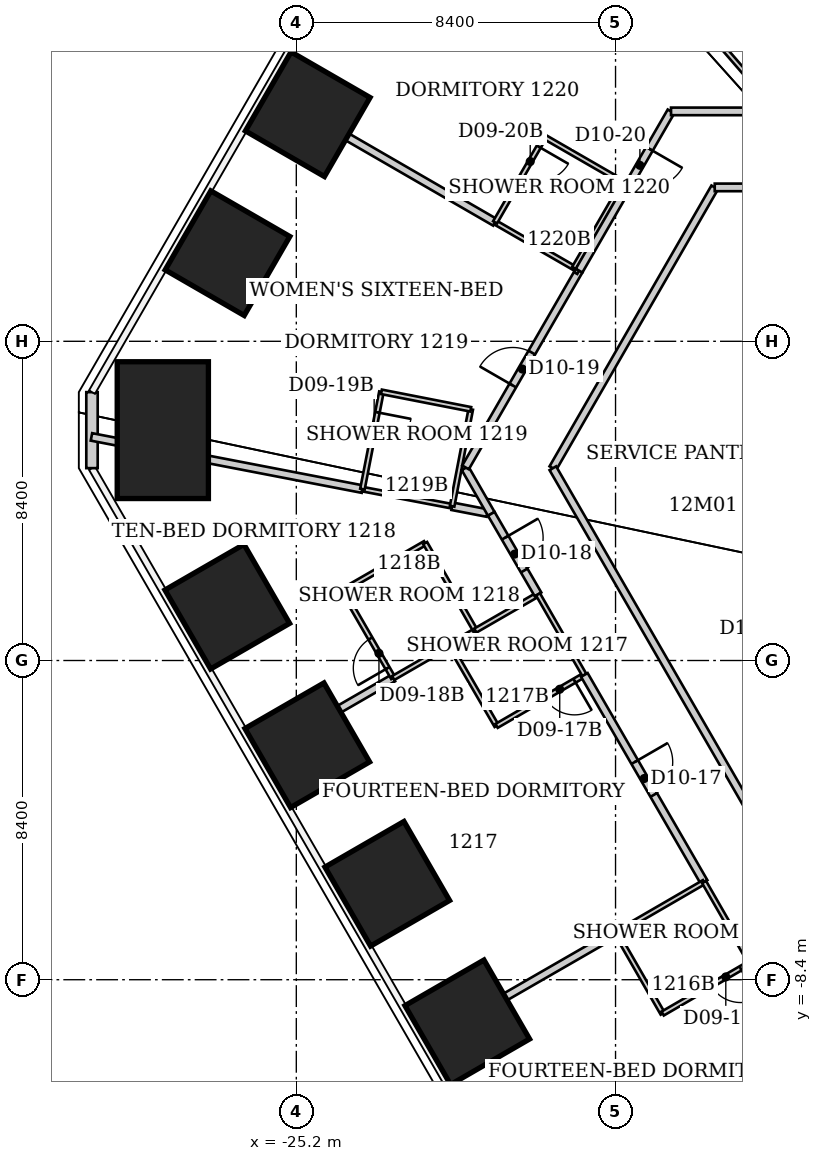
"""IFC4 building model, lengths in metres.
Left out: names, types, materials, properties, quantities, classifications, styles, units other than length and angle.
Written with IfcOpenShell. Run it as: python <this file> out.ifc"""

import sys

from ifc_helpers import new_model, si_unit, direction, frame, frame_2d, origin, origin_2d, place, context, subcontext, project, spatial, rectangle, extrude, clip, halfspace, element, fill, save


model = new_model("IFC4")
c1 = context("Model", 3, precision=1e-05, world=origin(), true_north=direction((0.0, 1.0)))
c2 = subcontext(c1, "Body", "Model", "MODEL_VIEW")
j1 = project(units=[si_unit("LENGTHUNIT", "METRE"), si_unit("PLANEANGLEUNIT", "RADIAN")], contexts=[c1])
p1 = place(None, origin())
s1 = spatial("IfcSite", under=j1, at=p1, CompositionType="ELEMENT")
p2 = place(p1, origin())
s2 = spatial("IfcBuilding", under=s1, at=p2, CompositionType="ELEMENT")
p3 = place(p2, frame((0.0, 0.0, 53.4)))
s3 = spatial("IfcBuildingStorey", under=s2, at=p3, CompositionType="ELEMENT", Elevation=53.4)
p4 = place(p3, frame((-20.701, -9.521, 0.0), z_axis=(0.0, 0.0, 1.0), x_axis=(-0.866025403784, -0.5, 0.0)))
e1 = element("IfcColumn", 1, at=p4, inside=s3, PredefinedType="COLUMN", context=c2, shape_type="SweptSolid", body=[
    clip(extrude(rectangle(XDim=2.4, YDim=2.4, at=origin_2d()), origin(), (0.0, 0.0, 1.0), 3.752), halfspace(frame((0.0, 0.0, 3.64)), False)),
])
p5 = place(p3, frame((-22.806, -5.875, 0.0), z_axis=(0.0, 0.0, 1.0), x_axis=(-0.866025403784, -0.5, 0.0)))
e2 = element("IfcColumn", 2, at=p5, inside=s3, PredefinedType="COLUMN", context=c2, shape_type="SweptSolid", body=[
    clip(extrude(rectangle(XDim=2.4, YDim=2.4, at=origin_2d()), origin(), (0.0, 0.0, 1.0), 3.744), halfspace(frame((0.0, 0.0, 3.64)), False)),
])
p6 = place(p3, frame((-24.911, -2.23, 0.0), z_axis=(0.0, 0.0, 1.0), x_axis=(-0.866025403784, -0.5, 0.0)))
e3 = element("IfcColumn", 3, at=p6, inside=s3, PredefinedType="COLUMN", context=c2, shape_type="SweptSolid", body=[
    clip(extrude(rectangle(XDim=2.4, YDim=2.4, at=origin_2d()), origin(), (0.0, 0.0, 1.0), 3.736), halfspace(frame((0.0, 0.0, 3.64)), False)),
])
p7 = place(p3, frame((-27.016, 1.416, 0.0), z_axis=(0.0, 0.0, 1.0), x_axis=(-0.866025403784, -0.5, 0.0)))
e4 = element("IfcColumn", 4, at=p7, inside=s3, PredefinedType="COLUMN", context=c2, shape_type="SweptSolid", body=[
    clip(extrude(rectangle(XDim=2.4, YDim=2.4, at=origin_2d()), origin(), (0.0, 0.0, 1.0), 3.728), halfspace(frame((0.0, 0.0, 3.64)), False)),
])
p8 = place(p3, frame((-28.713, 6.062, 0.0), z_axis=(0.0, 0.0, 1.0), x_axis=(-1.0, 0.0, 0.0)))
e5 = element("IfcColumn", 5, at=p8, inside=s3, PredefinedType="COLUMN", context=c2, shape_type="SweptSolid", body=[
    clip(extrude(rectangle(XDim=2.4, YDim=3.6, at=origin_2d()), origin(), (0.0, 0.0, 1.0), 3.726), halfspace(frame((0.0, 0.0, 3.64)), False)),
])
p9 = place(p3, frame((-27.01, 10.719, 0.0), z_axis=(0.0, 0.0, 1.0), x_axis=(-0.866025403784, 0.5, 0.0)))
e6 = element("IfcColumn", 6, at=p9, inside=s3, PredefinedType="COLUMN", context=c2, shape_type="SweptSolid", body=[
    clip(extrude(rectangle(XDim=2.4, YDim=2.4, at=origin_2d()), origin(), (0.0, 0.0, 1.0), 3.737), halfspace(frame((0.0, 0.0, 3.64)), False)),
])
p10 = place(p3, frame((-24.899, 14.375, 0.0), z_axis=(0.0, 0.0, 1.0), x_axis=(-0.866025403784, 0.5, 0.0)))
e7 = element("IfcColumn", 7, at=p10, inside=s3, PredefinedType="COLUMN", context=c2, shape_type="SweptSolid", body=[
    clip(extrude(rectangle(XDim=2.4, YDim=2.4, at=origin_2d()), origin(), (0.0, 0.0, 1.0), 3.745), halfspace(frame((0.0, 0.0, 3.64)), False)),
])
p11 = place(p3, frame((-30.576, 5.062, 0.0), z_axis=(0.0, 0.0, 1.0), x_axis=(0.0, 1.0, 0.0)))
e8 = element("IfcWall", 8, at=p11, inside=s3, PredefinedType="SOLIDWALL", context=c2, shape_type="SweptSolid", body=[
    extrude(rectangle(XDim=2.0, YDim=0.3, at=frame_2d((1.0, 0.0))), origin(), (0.0, 0.0, 1.0), 3.64),
])
p12 = place(p3, frame((-30.591, 5.884, 0.0), z_axis=(0.0, 0.0, 1.0), x_axis=(0.981929870864, -0.189245155035, 0.0)))
e9 = element("IfcWall", 9, at=p12, inside=s3, PredefinedType="PARTITIONING", context=c2, shape_type="SweptSolid", body=[
    extrude(rectangle(XDim=7.262, YDim=0.2, at=frame_2d((3.631, 0.0))), origin(), (0.0, 0.0, 1.0), 3.64),
])
p13 = place(p3, frame((-26.096, -2.45, 0.0), z_axis=(0.0, 0.0, 1.0), x_axis=(0.866022120267, 0.500005687176, 0.0)))
e10 = element("IfcWall", 10, at=p13, inside=s3, PredefinedType="PARTITIONING", context=c2, shape_type="SweptSolid", body=[
    extrude(rectangle(XDim=3.979, YDim=0.2, at=frame_2d((1.99, 0.0))), origin(), (0.0, 0.0, 1.0), 3.64),
])
p14 = place(p3, frame((-25.886, 14.95, 0.0), z_axis=(0.0, 0.0, 1.0), x_axis=(0.865761194987, -0.500457344092, 0.0)))
e11 = element("IfcWall", 11, at=p14, inside=s3, PredefinedType="PARTITIONING", context=c2, shape_type="SweptSolid", body=[
    extrude(rectangle(XDim=6.833, YDim=0.2, at=frame_2d((3.417, 0.0))), origin(), (0.0, 0.0, 1.0), 2.86),
])
p15 = place(p3, frame((-23.98, 1.84, 0.0), z_axis=(0.0, 0.0, 1.0), x_axis=(0.500605174168, -0.865675724273, 0.0)))
e12 = element("IfcWall", 12, at=p15, inside=s3, PredefinedType="PARTITIONING", context=c2, shape_type="SweptSolid", body=[
    extrude(rectangle(XDim=2.657, YDim=0.12, at=frame_2d((1.329, 0.0))), origin(), (0.0, 0.0, 1.0), 3.64),
])
p16 = place(p15, frame((1.457, 0.0, 0.0)))
e13 = element("IfcOpeningElement", 13, at=p16, cuts=e12, PredefinedType="OPENING", context=c2, shape_type="SweptSolid", body=[
    extrude(rectangle(XDim=0.9, YDim=2.03, at=frame_2d((0.45, 1.015))), frame((0.0, 0.06, 0.0), z_axis=(0.0, -1.0, 0.0), x_axis=(1.0, 0.0, 0.0)), (0.0, 0.0, 1.0), 0.12),
])
p17 = place(p3, frame((-23.46, 4.51, 0.0), z_axis=(0.0, 0.0, 1.0), x_axis=(0.982228999139, -0.187686422658, 0.0)))
e14 = element("IfcWall", 14, at=p17, inside=s3, PredefinedType="PARTITIONING", context=c2, shape_type="SweptSolid", body=[
    extrude(rectangle(XDim=2.403, YDim=0.12, at=frame_2d((1.201, 0.0))), origin(), (0.0, 0.0, 1.0), 3.64),
])
p18 = place(p3, frame((-22.96, 7.07, 0.0), z_axis=(0.0, 0.0, 1.0), x_axis=(-0.191686286181, -0.981456248485, 0.0)))
e15 = element("IfcWall", 15, at=p18, inside=s3, PredefinedType="PARTITIONING", context=c2, shape_type="SweptSolid", body=[
    extrude(rectangle(XDim=2.608, YDim=0.12, at=frame_2d((1.304, 0.0))), origin(), (0.0, 0.0, 1.0), 3.64),
])
p19 = place(p18, frame((0.55, 0.0, 0.0)))
e16 = element("IfcOpeningElement", 16, at=p19, cuts=e15, PredefinedType="OPENING", context=c2, shape_type="SweptSolid", body=[
    extrude(rectangle(XDim=0.9, YDim=2.03, at=frame_2d((0.45, 1.015))), frame((0.0, 0.06, 0.0), z_axis=(0.0, -1.0, 0.0), x_axis=(1.0, 0.0, 0.0)), (0.0, 0.0, 1.0), 0.12),
])
p20 = place(p3, frame((-22.65, -0.46, 0.0), z_axis=(0.0, 0.0, 1.0), x_axis=(0.866060346521, 0.499939472521, 0.0)))
e17 = element("IfcWall", 17, at=p20, inside=s3, PredefinedType="PARTITIONING", context=c2, shape_type="SweptSolid", body=[
    extrude(rectangle(XDim=1.72, YDim=0.12, at=frame_2d((0.86, 0.0))), origin(), (0.0, 0.0, 1.0), 3.64),
])
p21 = place(p3, frame((-21.81, 3.09, 0.0), z_axis=(0.0, 0.0, 1.0), x_axis=(-0.866510016372, -0.499159685399, 0.0)))
e18 = element("IfcWall", 18, at=p21, inside=s3, PredefinedType="PARTITIONING", context=c2, shape_type="SweptSolid", body=[
    extrude(rectangle(XDim=2.504, YDim=0.12, at=frame_2d((1.252, 0.0))), origin(), (0.0, 0.0, 1.0), 3.64),
])
p22 = place(p3, frame((-21.726, -10.02, 0.0), z_axis=(0.0, 0.0, 1.0), x_axis=(0.866442508333, 0.499276856818, 0.0)))
e19 = element("IfcWall", 19, at=p22, inside=s3, PredefinedType="PARTITIONING", context=c2, shape_type="SweptSolid", body=[
    extrude(rectangle(XDim=5.708, YDim=0.2, at=frame_2d((2.854, 0.0))), origin(), (0.0, 0.0, 1.0), 3.023),
])
p23 = place(p3, frame((-21.16, 0.4, 0.0), z_axis=(0.0, 0.0, 1.0), x_axis=(0.865907519724, 0.500204125617, 0.0)))
e20 = element("IfcWall", 20, at=p23, inside=s3, PredefinedType="PARTITIONING", context=c2, shape_type="SweptSolid", body=[
    extrude(rectangle(XDim=0.775, YDim=0.12, at=frame_2d((0.388, 0.0))), origin(), (0.0, 0.0, 1.0), 3.64),
])
p24 = place(p3, frame((-21.16, 0.4, 0.0), z_axis=(0.0, 0.0, 1.0), x_axis=(0.501856726365, -0.86495076519, 0.0)))
e21 = element("IfcWall", 21, at=p24, inside=s3, PredefinedType="PARTITIONING", context=c2, shape_type="SweptSolid", body=[
    extrude(rectangle(XDim=2.451, YDim=0.12, at=frame_2d((1.226, 0.0))), origin(), (0.0, 0.0, 1.0), 3.64),
])
p25 = place(p3, frame((-21.1, 4.059, 0.0), z_axis=(0.0, 0.0, 1.0), x_axis=(0.981823396721, -0.189796779877, 0.0)))
e22 = element("IfcWall", 22, at=p25, inside=s3, PredefinedType="PARTITIONING", context=c2, shape_type="SweptSolid", body=[
    extrude(rectangle(XDim=0.944, YDim=0.2, at=frame_2d((0.472, 0.0))), origin(), (0.0, 0.0, 1.0), 3.64),
])
p26 = place(p3, frame((-21.1, 4.06, 0.0), z_axis=(0.0, 0.0, 1.0), x_axis=(0.188697442844, 0.982035271802, 0.0)))
e23 = element("IfcWall", 23, at=p26, inside=s3, PredefinedType="PARTITIONING", context=c2, shape_type="SweptSolid", body=[
    extrude(rectangle(XDim=2.597, YDim=0.12, at=frame_2d((1.298, 0.0))), origin(), (0.0, 0.0, 1.0), 3.64),
])
p27 = place(p3, frame((-20.76, 5.06, 0.0), z_axis=(0.0, 0.0, 1.0), x_axis=(0.49845455473, -0.866915830325, 0.0)))
e24 = element("IfcWall", 24, at=p27, inside=s3, PredefinedType="PARTITIONING", context=c2, shape_type="SweptSolid", body=[
    extrude(rectangle(XDim=1.384, YDim=0.2, at=frame_2d((0.692, 0.0))), origin(), (0.0, 0.0, 1.0), 3.64),
])
p28 = place(p3, frame((-20.748, 5.082, 0.0), z_axis=(0.0, 0.0, 1.0), x_axis=(0.499925128535, 0.86606862653, 0.0)))
e25 = element("IfcWall", 25, at=p28, inside=s3, PredefinedType="PARTITIONING", context=c2, shape_type="SweptSolid", body=[
    extrude(rectangle(XDim=5.979, YDim=0.2, at=frame_2d((2.989, 0.0))), origin(), (0.0, 0.0, 1.0), 3.64),
])
p29 = place(p28, frame((2.489, 0.0, 0.0)))
e26 = element("IfcOpeningElement", 26, at=p29, cuts=e25, PredefinedType="OPENING", context=c2, shape_type="SweptSolid", body=[
    extrude(rectangle(XDim=1.0, YDim=2.13, at=frame_2d((0.5, 1.065))), frame((0.0, 0.1, 0.0), z_axis=(0.0, -1.0, 0.0), x_axis=(1.0, 0.0, 0.0)), (0.0, 0.0, 1.0), 0.2),
])
p30 = place(p3, frame((-20.61, 6.61, 0.0), z_axis=(0.0, 0.0, 1.0), x_axis=(-0.981376361672, 0.192094863937, 0.0)))
e27 = element("IfcWall", 27, at=p30, inside=s3, PredefinedType="PARTITIONING", context=c2, shape_type="SweptSolid", body=[
    extrude(rectangle(XDim=2.395, YDim=0.12, at=frame_2d((1.197, 0.0))), origin(), (0.0, 0.0, 1.0), 3.64),
])
p31 = place(p3, frame((-20.49, 0.79, 0.0), z_axis=(0.0, 0.0, 1.0), x_axis=(-0.497773911185, 0.867306827682, 0.0)))
e28 = element("IfcWall", 28, at=p31, inside=s3, PredefinedType="PARTITIONING", context=c2, shape_type="SweptSolid", body=[
    extrude(rectangle(XDim=2.652, YDim=0.12, at=frame_2d((1.326, 0.0))), origin(), (0.0, 0.0, 1.0), 3.64),
])
p32 = place(p3, frame((-20.489, 0.788, 0.0), z_axis=(0.0, 0.0, 1.0), x_axis=(0.865905802456, 0.500207098383, 0.0)))
e29 = element("IfcWall", 29, at=p32, inside=s3, PredefinedType="PARTITIONING", context=c2, shape_type="SweptSolid", body=[
    extrude(rectangle(XDim=1.904, YDim=0.12, at=frame_2d((0.952, 0.0))), origin(), (0.0, 0.0, 1.0), 3.64),
])
p33 = place(p3, frame((-20.07, 3.86, 0.0), z_axis=(0.0, 0.0, 1.0), x_axis=(0.501738959866, -0.865019084271, 0.0)))
e30 = element("IfcWall", 30, at=p33, inside=s3, PredefinedType="PARTITIONING", context=c2, shape_type="SweptSolid", body=[
    extrude(rectangle(XDim=2.451, YDim=0.2, at=frame_2d((1.226, 0.0))), origin(), (0.0, 0.0, 1.0), 3.64),
])
p34 = place(p33, frame((0.726, 0.0, 0.0)))
e31 = element("IfcOpeningElement", 31, at=p34, cuts=e30, PredefinedType="OPENING", context=c2, shape_type="SweptSolid", body=[
    extrude(rectangle(XDim=1.0, YDim=2.13, at=frame_2d((0.5, 1.065))), frame((0.0, 0.1, 0.0), z_axis=(0.0, -1.0, 0.0), x_axis=(1.0, 0.0, 0.0)), (0.0, 0.0, 1.0), 0.2),
])
p35 = place(p3, frame((-19.97, 11.53, 0.0), z_axis=(0.0, 0.0, 1.0), x_axis=(0.866177122335, -0.499737123639, 0.0)))
e32 = element("IfcWall", 32, at=p35, inside=s3, PredefinedType="PARTITIONING", context=c2, shape_type="SweptSolid", body=[
    extrude(rectangle(XDim=2.401, YDim=0.12, at=frame_2d((1.201, 0.0))), origin(), (0.0, 0.0, 1.0), 2.86),
])
p36 = place(p3, frame((-19.93, -1.72, 0.0), z_axis=(0.0, 0.0, 1.0), x_axis=(0.865006586495, 0.501760505939, 0.0)))
e33 = element("IfcWall", 33, at=p36, inside=s3, PredefinedType="PARTITIONING", context=c2, shape_type="SweptSolid", body=[
    extrude(rectangle(XDim=2.67, YDim=0.12, at=frame_2d((1.335, 0.0))), origin(), (0.0, 0.0, 1.0), 2.878),
])
p37 = place(p36, frame((1.47, 0.0, 0.0)))
e34 = element("IfcOpeningElement", 34, at=p37, cuts=e33, PredefinedType="OPENING", context=c2, shape_type="SweptSolid", body=[
    extrude(rectangle(XDim=0.9, YDim=2.03, at=frame_2d((0.45, 1.015))), frame((0.0, 0.06, 0.0), z_axis=(0.0, -1.0, 0.0), x_axis=(1.0, 0.0, 0.0)), (0.0, 0.0, 1.0), 0.12),
])
p38 = place(p3, frame((-18.84, 1.74, 0.0), z_axis=(0.0, 0.0, 1.0), x_axis=(0.498555508765, -0.866857776501, 0.0)))
e35 = element("IfcWall", 35, at=p38, inside=s3, PredefinedType="PARTITIONING", context=c2, shape_type="SweptSolid", body=[
    extrude(rectangle(XDim=2.446, YDim=0.12, at=frame_2d((1.223, 0.0))), origin(), (0.0, 0.0, 1.0), 3.64),
])
p39 = place(p3, frame((-18.67, 13.78, 0.0), z_axis=(0.0, 0.0, 1.0), x_axis=(-0.500291685314, -0.865856933682, 0.0)))
e36 = element("IfcWall", 36, at=p39, inside=s3, PredefinedType="PARTITIONING", context=c2, shape_type="SweptSolid", body=[
    extrude(rectangle(XDim=2.599, YDim=0.12, at=frame_2d((1.299, 0.0))), origin(), (0.0, 0.0, 1.0), 3.64),
])
p40 = place(p39, frame((0.3, 0.0, 0.0)))
e37 = element("IfcOpeningElement", 37, at=p40, cuts=e36, PredefinedType="OPENING", context=c2, shape_type="SweptSolid", body=[
    extrude(rectangle(XDim=0.9, YDim=2.03, at=frame_2d((0.45, 1.015))), frame((0.0, 0.06, 0.0), z_axis=(0.0, -1.0, 0.0), x_axis=(1.0, 0.0, 0.0)), (0.0, 0.0, 1.0), 0.12),
])
p41 = place(p3, frame((-18.45, 5.06, 0.0), z_axis=(0.0, 0.0, 1.0), x_axis=(0.499424260127, 0.866357552282, 0.0)))
e38 = element("IfcWall", 38, at=p41, inside=s3, PredefinedType="PARTITIONING", context=c2, shape_type="SweptSolid", body=[
    extrude(rectangle(XDim=8.53, YDim=0.2, at=frame_2d((4.265, 0.0))), origin(), (0.0, 0.0, 1.0), 3.64),
])
p42 = place(p3, frame((-17.89, 10.33, 0.0), z_axis=(0.0, 0.0, 1.0), x_axis=(0.500221244143, 0.865897630733, 0.0)))
e39 = element("IfcWall", 39, at=p42, inside=s3, PredefinedType="PARTITIONING", context=c2, shape_type="SweptSolid", body=[
    extrude(rectangle(XDim=2.598, YDim=0.12, at=frame_2d((1.299, 0.0))), origin(), (0.0, 0.0, 1.0), 3.64),
])
p43 = place(p3, frame((-17.837, 10.302, 0.0), z_axis=(0.0, 0.0, 1.0), x_axis=(0.880650010303, -0.473767410606, 0.0)))
e40 = element("IfcWall", 40, at=p43, inside=s3, PredefinedType="PARTITIONING", context=c2, shape_type="SweptSolid", body=[
    extrude(rectangle(XDim=0.088, YDim=0.2, at=frame_2d((0.044, 0.0))), origin(), (0.0, 0.0, 1.0), 3.64),
])
p44 = place(p3, frame((-17.759, 10.259, 0.0), z_axis=(0.0, 0.0, 1.0), x_axis=(0.499878240725, 0.866095690123, 0.0)))
e41 = element("IfcWall", 41, at=p44, inside=s3, PredefinedType="PARTITIONING", context=c2, shape_type="SweptSolid", body=[
    extrude(rectangle(XDim=4.839, YDim=0.2, at=frame_2d((2.419, 0.0))), origin(), (0.0, 0.0, 1.0), 3.64),
])
p45 = place(p44, frame((2.7, 0.0, 0.0)))
e42 = element("IfcOpeningElement", 42, at=p45, cuts=e41, PredefinedType="OPENING", context=c2, shape_type="SweptSolid", body=[
    extrude(rectangle(XDim=1.0, YDim=2.13, at=frame_2d((0.5, 1.065))), frame((0.0, 0.1, 0.0), z_axis=(0.0, -1.0, 0.0), x_axis=(1.0, 0.0, 0.0)), (0.0, 0.0, 1.0), 0.2),
])
p46 = place(p3, frame((-17.621, -0.38, 0.0), z_axis=(0.0, 0.0, 1.0), x_axis=(0.500505674396, -0.865733255627, 0.0)))
e43 = element("IfcWall", 43, at=p46, inside=s3, PredefinedType="PARTITIONING", context=c2, shape_type="SweptSolid", body=[
    extrude(rectangle(XDim=6.295, YDim=0.2, at=frame_2d((3.147, 0.0))), origin(), (0.0, 0.0, 1.0), 3.64),
])
p47 = place(p46, frame((2.647, 0.0, 0.0)))
e44 = element("IfcOpeningElement", 44, at=p47, cuts=e43, PredefinedType="OPENING", context=c2, shape_type="SweptSolid", body=[
    extrude(rectangle(XDim=1.0, YDim=2.13, at=frame_2d((0.5, 1.065))), frame((0.0, 0.1, 0.0), z_axis=(0.0, -1.0, 0.0), x_axis=(1.0, 0.0, 0.0)), (0.0, 0.0, 1.0), 0.2),
])
p48 = place(p3, frame((-16.78, -7.17, 0.0), z_axis=(0.0, 0.0, 1.0), x_axis=(0.498748634132, -0.866746675766, 0.0)))
e45 = element("IfcWall", 45, at=p48, inside=s3, PredefinedType="PARTITIONING", context=c2, shape_type="SweptSolid", body=[
    extrude(rectangle(XDim=2.446, YDim=0.12, at=frame_2d((1.223, 0.0))), origin(), (0.0, 0.0, 1.0), 3.64),
])
p49 = place(p3, frame((-16.78, -7.17, 0.0), z_axis=(0.0, 0.0, 1.0), x_axis=(0.865029602175, 0.501720826119, 0.0)))
e46 = element("IfcWall", 46, at=p49, inside=s3, PredefinedType="PARTITIONING", context=c2, shape_type="SweptSolid", body=[
    extrude(rectangle(XDim=2.67, YDim=0.12, at=frame_2d((1.335, 0.0))), origin(), (0.0, 0.0, 1.0), 3.023),
])
p50 = place(p3, frame((-16.59, 12.58, 0.0), z_axis=(0.0, 0.0, 1.0), x_axis=(-0.866177122335, 0.499737123639, 0.0)))
e47 = element("IfcWall", 47, at=p50, inside=s3, PredefinedType="PARTITIONING", context=c2, shape_type="SweptSolid", body=[
    extrude(rectangle(XDim=2.401, YDim=0.12, at=frame_2d((1.201, 0.0))), origin(), (0.0, 0.0, 1.0), 3.64),
])
p51 = place(p3, frame((-15.56, -9.29, 0.0), z_axis=(0.0, 0.0, 1.0), x_axis=(0.86498992408, 0.501789229896, 0.0)))
e48 = element("IfcWall", 48, at=p51, inside=s3, PredefinedType="PARTITIONING", context=c2, shape_type="SweptSolid", body=[
    extrude(rectangle(XDim=2.671, YDim=0.12, at=frame_2d((1.335, 0.0))), origin(), (0.0, 0.0, 1.0), 3.64),
])
p52 = place(p51, frame((1.47, 0.0, 0.0)))
e49 = element("IfcOpeningElement", 49, at=p52, cuts=e48, PredefinedType="OPENING", context=c2, shape_type="SweptSolid", body=[
    extrude(rectangle(XDim=0.9, YDim=2.03, at=frame_2d((0.45, 1.015))), frame((0.0, 0.06, 0.0), z_axis=(0.0, -1.0, 0.0), x_axis=(1.0, 0.0, 0.0)), (0.0, 0.0, 1.0), 0.12),
])
p53 = place(p3, frame((-14.47, -5.83, 0.0), z_axis=(0.0, 0.0, 1.0), x_axis=(0.498673646582, -0.86678982124, 0.0)))
e50 = element("IfcWall", 50, at=p53, inside=s3, PredefinedType="PARTITIONING", context=c2, shape_type="SweptSolid", body=[
    extrude(rectangle(XDim=2.446, YDim=0.12, at=frame_2d((1.223, 0.0))), origin(), (0.0, 0.0, 1.0), 3.64),
])
p54 = place(p3, frame((-14.19, 12.45, 0.0), z_axis=(0.0, 0.0, 1.0), x_axis=(1.0, 0.0, 0.0)))
e51 = element("IfcWall", 51, at=p54, inside=s3, PredefinedType="PARTITIONING", context=c2, shape_type="SweptSolid", body=[
    extrude(rectangle(XDim=4.96, YDim=0.2, at=frame_2d((2.48, 0.0))), origin(), (0.0, 0.0, 1.0), 3.64),
])
p55 = place(p3, frame((-14.185, 16.376, 0.0), z_axis=(0.0, 0.0, 1.0), x_axis=(0.655147063502, -0.755501373384, 0.0)))
e52 = element("IfcWall", 52, at=p55, inside=s3, PredefinedType="PARTITIONING", context=c2, shape_type="SweptSolid", body=[
    extrude(rectangle(XDim=2.404, YDim=0.12, at=frame_2d((1.202, 0.0))), origin(), (0.0, 0.0, 1.0), 3.64),
])
p56 = place(p3, frame((-12.51, 14.45, 0.0), z_axis=(0.0, 0.0, 1.0), x_axis=(-1.0, 0.0, 0.0)))
e53 = element("IfcWall", 53, at=p56, inside=s3, PredefinedType="PARTITIONING", context=c2, shape_type="SweptSolid", body=[
    extrude(rectangle(XDim=2.83, YDim=0.2, at=frame_2d((1.415, 0.0))), origin(), (0.0, 0.0, 1.0), 3.64),
])
p57 = place(p3, frame((-11.147, -7.591, 0.0), z_axis=(0.0, 0.0, 1.0), x_axis=(-0.499915842114, 0.866073986911, 0.0)))
e54 = element("IfcWall", 54, at=p57, inside=s3, PredefinedType="PARTITIONING", context=c2, shape_type="SweptSolid", body=[
    extrude(rectangle(XDim=14.607, YDim=0.2, at=frame_2d((7.304, 0.0))), origin(), (0.0, 0.0, 1.0), 3.64),
])
p58 = place(p52, origin())
e55 = element("IfcDoor", 55, at=p58, inside=s3, OperationType="SINGLE_SWING_RIGHT", PredefinedType="DOOR", context=c2, shape_type="SweptSolid", body=[
    extrude(rectangle(XDim=0.9, YDim=2.03, at=frame_2d((0.45, 1.015))), frame((0.0, 0.025, 0.0), z_axis=(0.0, -1.0, 0.0), x_axis=(1.0, 0.0, 0.0)), (0.0, 0.0, 1.0), 0.05),
])
fill(e49, e55)
p59 = place(p47, origin())
e56 = element("IfcDoor", 56, at=p59, inside=s3, OperationType="SINGLE_SWING_LEFT", PredefinedType="DOOR", context=c2, shape_type="SweptSolid", body=[
    extrude(rectangle(XDim=1.0, YDim=2.13, at=frame_2d((0.5, 1.065))), frame((0.0, 0.025, 0.0), z_axis=(0.0, -1.0, 0.0), x_axis=(1.0, 0.0, 0.0)), (0.0, 0.0, 1.0), 0.05),
])
fill(e44, e56)
p60 = place(p37, origin())
e57 = element("IfcDoor", 57, at=p60, inside=s3, OperationType="SINGLE_SWING_RIGHT", PredefinedType="DOOR", context=c2, shape_type="SweptSolid", body=[
    extrude(rectangle(XDim=0.9, YDim=2.03, at=frame_2d((0.45, 1.015))), frame((0.0, 0.025, 0.0), z_axis=(0.0, -1.0, 0.0), x_axis=(1.0, 0.0, 0.0)), (0.0, 0.0, 1.0), 0.05),
])
fill(e34, e57)
p61 = place(p34, origin())
e58 = element("IfcDoor", 58, at=p61, inside=s3, OperationType="SINGLE_SWING_LEFT", PredefinedType="DOOR", context=c2, shape_type="SweptSolid", body=[
    extrude(rectangle(XDim=1.0, YDim=2.13, at=frame_2d((0.5, 1.065))), frame((0.0, 0.025, 0.0), z_axis=(0.0, -1.0, 0.0), x_axis=(1.0, 0.0, 0.0)), (0.0, 0.0, 1.0), 0.05),
])
fill(e31, e58)
p62 = place(p16, origin())
e59 = element("IfcDoor", 59, at=p62, inside=s3, OperationType="SINGLE_SWING_RIGHT", PredefinedType="DOOR", context=c2, shape_type="SweptSolid", body=[
    extrude(rectangle(XDim=0.9, YDim=2.03, at=frame_2d((0.45, 1.015))), frame((0.0, 0.025, 0.0), z_axis=(0.0, -1.0, 0.0), x_axis=(1.0, 0.0, 0.0)), (0.0, 0.0, 1.0), 0.05),
])
fill(e13, e59)
p63 = place(p29, origin())
e60 = element("IfcDoor", 60, at=p63, inside=s3, OperationType="SINGLE_SWING_LEFT", PredefinedType="DOOR", context=c2, shape_type="SweptSolid", body=[
    extrude(rectangle(XDim=1.0, YDim=2.13, at=frame_2d((0.5, 1.065))), frame((0.0, 0.025, 0.0), z_axis=(0.0, -1.0, 0.0), x_axis=(1.0, 0.0, 0.0)), (0.0, 0.0, 1.0), 0.05),
])
fill(e26, e60)
p64 = place(p19, origin())
e61 = element("IfcDoor", 61, at=p64, inside=s3, OperationType="SINGLE_SWING_LEFT", PredefinedType="DOOR", context=c2, shape_type="SweptSolid", body=[
    extrude(rectangle(XDim=0.9, YDim=2.03, at=frame_2d((0.45, 1.015))), frame((0.0, 0.025, 0.0), z_axis=(0.0, -1.0, 0.0), x_axis=(1.0, 0.0, 0.0)), (0.0, 0.0, 1.0), 0.05),
])
fill(e16, e61)
p65 = place(p45, origin())
e62 = element("IfcDoor", 62, at=p65, inside=s3, OperationType="SINGLE_SWING_RIGHT", PredefinedType="DOOR", context=c2, shape_type="SweptSolid", body=[
    extrude(rectangle(XDim=1.0, YDim=2.13, at=frame_2d((0.5, 1.065))), frame((0.0, 0.025, 0.0), z_axis=(0.0, -1.0, 0.0), x_axis=(1.0, 0.0, 0.0)), (0.0, 0.0, 1.0), 0.05),
])
fill(e42, e62)
p66 = place(p40, origin())
e63 = element("IfcDoor", 63, at=p66, inside=s3, OperationType="SINGLE_SWING_LEFT", PredefinedType="DOOR", context=c2, shape_type="SweptSolid", body=[
    extrude(rectangle(XDim=0.9, YDim=2.03, at=frame_2d((0.45, 1.015))), frame((0.0, 0.025, 0.0), z_axis=(0.0, -1.0, 0.0), x_axis=(1.0, 0.0, 0.0)), (0.0, 0.0, 1.0), 0.05),
])
fill(e37, e63)
save(model, sys.argv[1])
